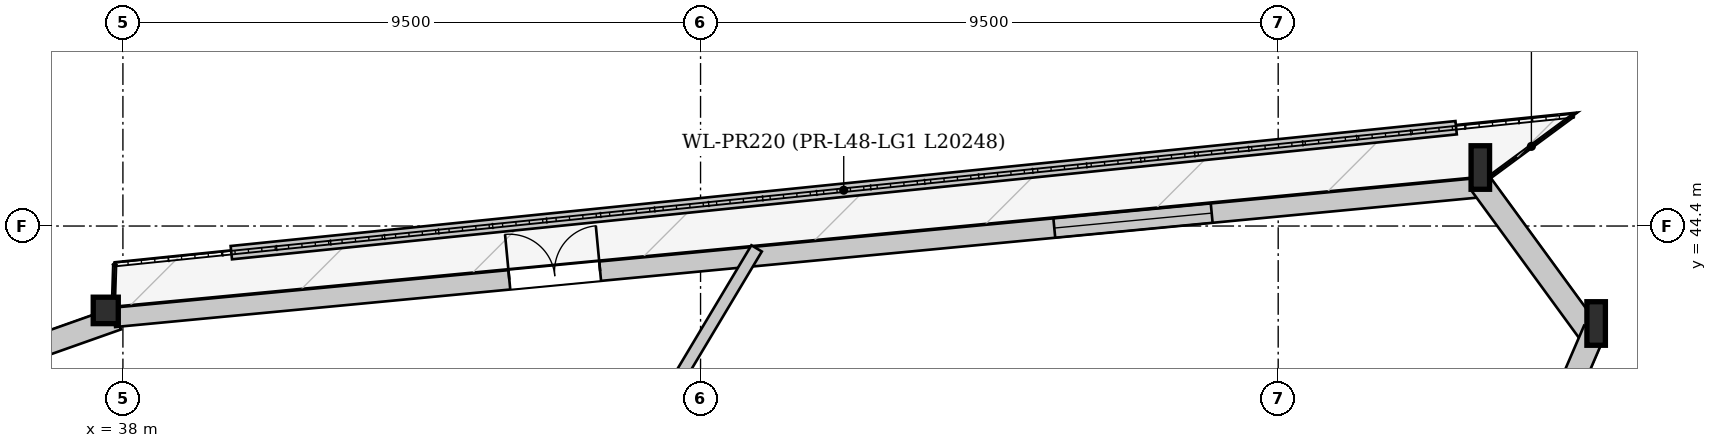
"""IFC4 building model, lengths in metres.
Left out: names, types, materials, properties, quantities, classifications, styles, units other than length and angle.
Written with IfcOpenShell. Run it as: python <this file> out.ifc"""

import sys

from ifc_helpers import new_model, si_unit, direction, frame, frame_2d, origin, origin_2d, place, context, subcontext, project, spatial, rectangle, i_section, extrude, source, transform, mapped, element, fill, save


model = new_model("IFC4")
c1 = context("Model", 3, precision=1e-05, world=origin(), true_north=direction((0.0, 1.0)))
c2 = subcontext(c1, "Body", "Model", "MODEL_VIEW")
j1 = project(units=[si_unit("LENGTHUNIT", "METRE"), si_unit("PLANEANGLEUNIT", "RADIAN")], contexts=[c1])
p1 = place(None, origin())
s1 = spatial("IfcSite", under=j1, at=p1, CompositionType="ELEMENT")
p2 = place(p1, origin())
s2 = spatial("IfcBuilding", under=s1, at=p2, CompositionType="ELEMENT")
p3 = place(p2, frame((0.0, 0.0, 182.1)))
s3 = spatial("IfcBuildingStorey", under=s2, at=p3, CompositionType="ELEMENT", Elevation=182.1)
m1 = source(origin(), c2, "Body", "SweptSolid", [
    extrude(i_section(OverallWidth=0.304, OverallDepth=0.716, WebThickness=0.021, FlangeThickness=0.04, at=origin_2d()), origin(), (0.0, 0.0, 1.0), 3.418),
])
p4 = place(p3, frame((62.38, 42.613, 0.0), z_axis=(-0.08806071749, 0.108058285128, 0.990236697487), x_axis=(-0.775188521165, -0.631729971313, 0.0)))
e1 = element("IfcColumn", 1, at=p4, inside=s3, PredefinedType="COLUMN", context=c2, shape_type="MappedRepresentation", body=[
    mapped(m1, transform((0.0, 0.0, 0.0), x_axis=(1.0, 0.0, 0.0), y_axis=(0.0, 1.0, 0.0), z_axis=(0.0, 0.0, 1.0), scale=1.0)),
])
m2 = source(origin(), c2, "Body", "SweptSolid", [
    extrude(i_section(OverallWidth=0.304, OverallDepth=0.716, WebThickness=0.021, FlangeThickness=0.04, at=origin_2d()), origin(), (0.0, 0.0, 1.0), 3.414),
])
p5 = place(p3, frame((60.484, 45.208, 0.0), z_axis=(-0.093253223651, 0.090392695318, 0.99153063337), x_axis=(-0.696008228581, -0.718033805435, 0.0)))
e2 = element("IfcColumn", 2, at=p5, inside=s3, PredefinedType="COLUMN", context=c2, shape_type="MappedRepresentation", body=[
    mapped(m2, transform((0.0, 0.0, 0.0), x_axis=(1.0, 0.0, 0.0), y_axis=(0.0, 1.0, 0.0), z_axis=(0.0, 0.0, 1.0), scale=1.0)),
])
m3 = source(origin(), c2, "Body", "SweptSolid", [
    extrude(i_section(OverallWidth=0.412, OverallDepth=0.435, WebThickness=0.031, FlangeThickness=0.05, at=origin_2d()), origin(), (0.0, 0.0, 1.0), 3.395),
])
p6 = place(p3, frame((37.842, 43.058, 0.0), z_axis=(-0.072913032199, -0.026677253398, 0.996981451125), x_axis=(0.343601453604, -0.93911556322, 0.0)))
e3 = element("IfcColumn", 3, at=p6, inside=s3, PredefinedType="COLUMN", context=c2, shape_type="MappedRepresentation", body=[
    mapped(m3, transform((0.0, 0.0, 0.0), x_axis=(1.0, 0.0, 0.0), y_axis=(0.0, 1.0, 0.0), z_axis=(0.0, 0.0, 1.0), scale=1.0)),
])
p7 = place(p3, frame((16.463, 35.293, 0.0), z_axis=(0.0, 0.0, 1.0), x_axis=(0.94274891149, 0.33350335813, 0.0)))
e4 = element("IfcWall", 4, at=p7, inside=s3, PredefinedType="SOLIDWALL", context=c2, shape_type="SweptSolid", body=[
    extrude(rectangle(XDim=22.744, YDim=0.38, at=frame_2d((11.372, 0.0))), origin(), (0.0, 0.0, 1.0), 2.722),
])
p8 = place(p7, frame((5.268, 0.0, 0.352)))
e5 = element("IfcOpeningElement", 5, at=p8, cuts=e4, PredefinedType="OPENING", context=c2, shape_type="SweptSolid", body=[
    extrude(rectangle(XDim=2.2, YDim=2.25, at=frame_2d((1.1, 1.125))), frame((0.0, 0.2, 0.0), z_axis=(0.0, -1.0, 0.0), x_axis=(1.0, 0.0, 0.0)), (0.0, 0.0, 1.0), 0.4),
])
p9 = place(p7, frame((15.276, 0.0, 0.352)))
e6 = element("IfcOpeningElement", 6, at=p9, cuts=e4, PredefinedType="OPENING", context=c2, shape_type="SweptSolid", body=[
    extrude(rectangle(XDim=2.2, YDim=2.25, at=frame_2d((1.1, 1.125))), frame((0.0, 0.2, 0.0), z_axis=(0.0, -1.0, 0.0), x_axis=(1.0, 0.0, 0.0)), (0.0, 0.0, 1.0), 0.4),
])
p10 = place(p3, frame((37.857, 42.898, 0.0), z_axis=(0.0, 0.0, 1.0), x_axis=(0.995520332202, 0.094547703155, 0.0)))
e7 = element("IfcWall", 7, at=p10, inside=s3, PredefinedType="SOLIDWALL", context=c2, shape_type="SweptSolid", body=[
    extrude(rectangle(XDim=22.744, YDim=0.32, at=frame_2d((11.372, 0.0))), origin(), (0.0, 0.0, 1.0), 2.722),
])
p11 = place(p10, frame((6.528, 0.0, 0.0)))
e8 = element("IfcOpeningElement", 8, at=p11, cuts=e7, PredefinedType="OPENING", context=c2, shape_type="SweptSolid", body=[
    extrude(rectangle(XDim=1.5, YDim=2.3, at=frame_2d((0.75, 1.15))), frame((0.0, 0.17, 0.0), z_axis=(0.0, -1.0, 0.0), x_axis=(1.0, 0.0, 0.0)), (0.0, 0.0, 1.0), 0.34),
])
p12 = place(p10, frame((15.531, 0.0, 0.252)))
e9 = element("IfcOpeningElement", 9, at=p12, cuts=e7, PredefinedType="OPENING", context=c2, shape_type="SweptSolid", body=[
    extrude(rectangle(XDim=2.6, YDim=2.35, at=frame_2d((1.3, 1.175))), frame((0.0, 0.17, 0.0), z_axis=(0.0, -1.0, 0.0), x_axis=(1.0, 0.0, 0.0)), (0.0, 0.0, 1.0), 0.34),
])
p13 = place(p3, frame((60.33, 45.096, 0.0), z_axis=(0.0, 0.0, 1.0), x_axis=(0.589877559106, -0.807492702917, 0.0)))
e10 = element("IfcWall", 10, at=p13, inside=s3, PredefinedType="SOLIDWALL", context=c2, shape_type="SweptSolid", body=[
    extrude(rectangle(XDim=3.214, YDim=0.38, at=frame_2d((1.607, 0.0))), origin(), (0.0, 0.0, 1.0), 2.722),
])
p14 = place(p3, frame((62.205, 42.688, 0.0), z_axis=(0.0, 0.0, 1.0), x_axis=(-0.395471845497, -0.918478099586, 0.0)))
e11 = element("IfcWall", 11, at=p14, inside=s3, PredefinedType="SOLIDWALL", context=c2, shape_type="SweptSolid", body=[
    extrude(rectangle(XDim=23.316, YDim=0.38, at=frame_2d((11.658, 0.0))), origin(), (0.0, 0.0, 1.0), 2.722),
])
p15 = place(p14, frame((4.679, 0.0, 0.352)))
e12 = element("IfcOpeningElement", 12, at=p15, cuts=e11, PredefinedType="OPENING", context=c2, shape_type="SweptSolid", body=[
    extrude(rectangle(XDim=2.2, YDim=2.25, at=frame_2d((1.1, 1.125))), frame((0.0, 0.2, 0.0), z_axis=(0.0, -1.0, 0.0), x_axis=(1.0, 0.0, 0.0)), (0.0, 0.0, 1.0), 0.4),
])
p16 = place(p14, frame((15.688, 0.0, 0.352)))
e13 = element("IfcOpeningElement", 13, at=p16, cuts=e11, PredefinedType="OPENING", context=c2, shape_type="SweptSolid", body=[
    extrude(rectangle(XDim=2.2, YDim=2.25, at=frame_2d((1.1, 1.125))), frame((0.0, 0.2, 0.0), z_axis=(0.0, -1.0, 0.0), x_axis=(1.0, 0.0, 0.0)), (0.0, 0.0, 1.0), 0.4),
])
p17 = place(p3, frame((59.927, 46.017, 0.0), z_axis=(0.0, 0.0, 1.0), x_axis=(-0.994838142645, -0.101474479251, 0.0)))
e14 = element("IfcWall", 14, at=p17, inside=s3, PredefinedType="PARAPET", context=c2, shape_type="SweptSolid", body=[
    extrude(rectangle(XDim=20.248, YDim=0.22, at=frame_2d((10.124, 0.0))), origin(), (0.0, 0.0, 1.0), 0.3),
])
p18 = place(p3, frame((43.739, 36.2, 0.0), z_axis=(0.0, 0.0, 1.0), x_axis=(0.51314560482, 0.858301571858, 0.0)))
e15 = element("IfcWall", 15, at=p18, inside=s3, PredefinedType="PARTITIONING", context=c2, shape_type="SweptSolid", body=[
    extrude(rectangle(XDim=9.125, YDim=0.2, at=frame_2d((4.562, 0.0))), origin(), (0.0, 0.0, 1.0), 3.33),
])
p19 = place(p3, frame((37.07, 36.2, 0.0), z_axis=(0.0, 0.0, 1.0), x_axis=(-0.096381803704, 0.995344436823, 0.0)))
e16 = element("IfcWall", 16, at=p19, inside=s3, PredefinedType="PARTITIONING", context=c2, shape_type="SweptSolid", body=[
    extrude(rectangle(XDim=6.365, YDim=0.2, at=frame_2d((3.183, 0.0))), origin(), (0.0, 0.0, 1.0), 3.33),
])
m4 = source(origin(), c2, "Body", "SweptSolid", [
    extrude(rectangle(XDim=1.5, YDim=2.3, at=frame_2d((0.75, 1.15))), frame((0.0, 0.025, 0.0), z_axis=(0.0, -1.0, 0.0), x_axis=(1.0, 0.0, 0.0)), (0.0, 0.0, 1.0), 0.05),
])
p20 = place(p11, origin())
e17 = element("IfcDoor", 17, at=p20, inside=s3, OperationType="DOUBLE_DOOR_SINGLE_SWING", PredefinedType="DOOR", context=c2, shape_type="MappedRepresentation", body=[
    mapped(m4, transform((0.0, 0.0, 0.0), x_axis=(1.0, 0.0, 0.0), y_axis=(0.0, 1.0, 0.0), z_axis=(0.0, 0.0, 1.0), scale=1.0)),
])
fill(e8, e17)
m5 = source(origin(), c2, "Body", "SweptSolid", [
    extrude(rectangle(XDim=2.6, YDim=2.35, at=frame_2d((1.3, 1.175))), frame((0.0, 0.03, 0.0), z_axis=(0.0, -1.0, 0.0), x_axis=(1.0, 0.0, 0.0)), (0.0, 0.0, 1.0), 0.06),
])
p21 = place(p12, origin())
e18 = element("IfcWindow", 18, at=p21, inside=s3, PartitioningType="SINGLE_PANEL", PredefinedType="WINDOW", context=c2, shape_type="MappedRepresentation", body=[
    mapped(m5, transform((0.0, 0.0, 0.0), x_axis=(1.0, 0.0, 0.0), y_axis=(0.0, 1.0, 0.0), z_axis=(0.0, 0.0, 1.0), scale=1.0)),
])
fill(e9, e18)
save(model, sys.argv[1])
